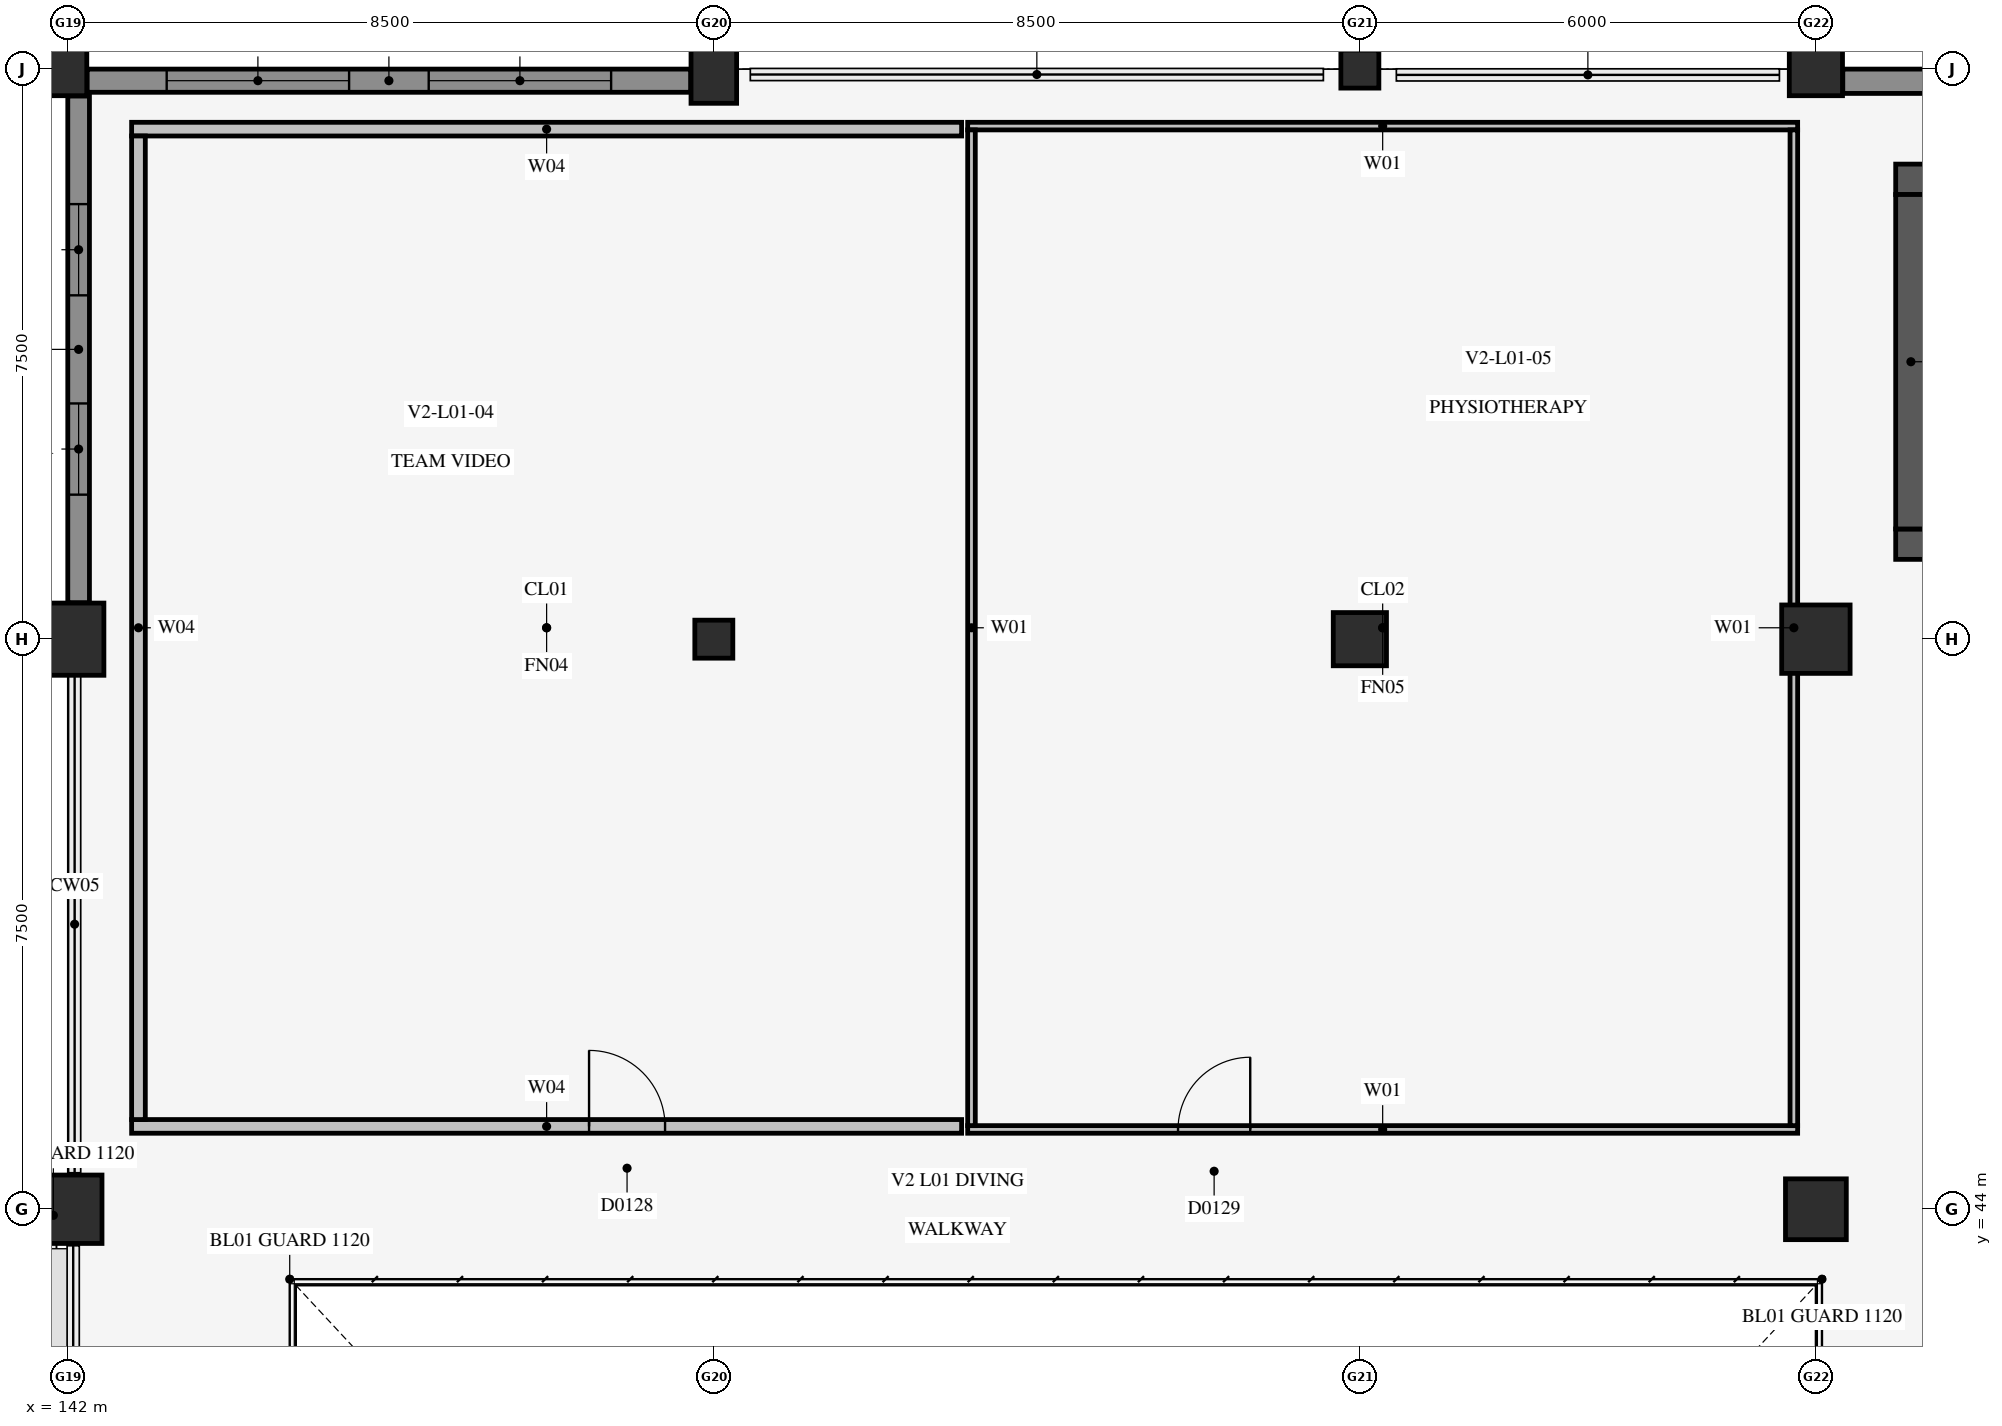
"""IFC4 building model, lengths in metres.
Left out: names, types, materials, properties, quantities, classifications, styles, units other than length and angle.
Written with IfcOpenShell. Run it as: python <this file> out.ifc"""

import sys

from ifc_helpers import new_model, si_unit, direction, frame, frame_2d, origin, origin_2d, place, context, subcontext, project, spatial, rectangle, circle, extrude, element, fill, save


model = new_model("IFC4")
c1 = context("Model", 3, precision=1e-05, world=origin(), true_north=direction((0.0, 1.0)))
c2 = subcontext(c1, "Body", "Model", "MODEL_VIEW")
j1 = project(units=[si_unit("LENGTHUNIT", "METRE"), si_unit("PLANEANGLEUNIT", "RADIAN")], contexts=[c1])
p1 = place(None, origin())
s1 = spatial("IfcSite", under=j1, at=p1, CompositionType="ELEMENT")
p2 = place(p1, origin())
s2 = spatial("IfcBuilding", under=s1, at=p2, CompositionType="ELEMENT")
p3 = place(p2, frame((0.0, 0.0, 5.4)))
s3 = spatial("IfcBuildingStorey", under=s2, at=p3, CompositionType="ELEMENT", Elevation=5.4)
p4 = place(p3, frame((166.05, 52.75, 0.0), z_axis=(0.0, 0.0, 1.0), x_axis=(1.0, 0.0, 0.0)))
e1 = element("IfcWall", 1, at=p4, inside=s3, PredefinedType="SHEAR", context=c2, shape_type="SweptSolid", body=[
    extrude(rectangle(XDim=9.5, YDim=0.4, at=frame_2d((4.75, 0.0))), origin(), (0.0, 0.0, 1.0), 4.56),
])
p5 = place(p4, frame((0.48, 0.0, 0.0)))
e2 = element("IfcOpeningElement", 2, at=p5, cuts=e1, PredefinedType="OPENING", context=c2, shape_type="SweptSolid", body=[
    extrude(rectangle(XDim=1.5, YDim=2.3, at=frame_2d((0.75, 1.15))), frame((0.0, 0.212, 0.0), z_axis=(0.0, -1.0, 0.0), x_axis=(1.0, 0.0, 0.0)), (0.0, 0.0, 1.0), 0.424),
])
p6 = place(p3, frame((166.05, 57.55, 0.0), z_axis=(0.0, 0.0, 1.0), x_axis=(1.0, 0.0, 0.0)))
e3 = element("IfcWall", 3, at=p6, inside=s3, PredefinedType="SHEAR", context=c2, shape_type="SweptSolid", body=[
    extrude(rectangle(XDim=9.5, YDim=0.4, at=frame_2d((4.75, 0.0))), origin(), (0.0, 0.0, 1.0), 4.56),
])
p7 = place(p3, frame((166.25, 52.95, 0.0), z_axis=(0.0, 0.0, 1.0), x_axis=(0.0, 1.0, 0.0)))
e4 = element("IfcWall", 4, at=p7, inside=s3, PredefinedType="SHEAR", context=c2, shape_type="SweptSolid", body=[
    extrude(rectangle(XDim=4.4, YDim=0.4, at=frame_2d((2.2, 0.0))), origin(), (0.0, 0.0, 1.0), 4.56),
])
p8 = place(p3, frame((142.0, 44.0, 0.0), z_axis=(0.0, 0.0, 1.0), x_axis=(1.0, 0.0, 0.0)))
e5 = element("IfcColumn", 5, at=p8, inside=s3, PredefinedType="COLUMN", context=c2, shape_type="SweptSolid", body=[
    extrude(rectangle(XDim=0.9, YDim=0.9, at=origin_2d()), origin(), (0.0, 0.0, 1.0), 4.8),
])
p9 = place(p3, frame((142.0, 51.5, 0.0), z_axis=(0.0, 0.0, 1.0), x_axis=(1.0, 0.0, 0.0)))
e6 = element("IfcColumn", 6, at=p9, inside=s3, PredefinedType="COLUMN", context=c2, shape_type="SweptSolid", body=[
    extrude(rectangle(XDim=0.95, YDim=0.95, at=origin_2d()), origin(), (0.0, 0.0, 1.0), 4.8),
])
p10 = place(p3, frame((142.0, 59.0, 0.0), z_axis=(0.0, 0.0, 1.0), x_axis=(1.0, 0.0, 0.0)))
e7 = element("IfcColumn", 7, at=p10, inside=s3, PredefinedType="COLUMN", context=c2, shape_type="SweptSolid", body=[
    extrude(rectangle(XDim=0.5, YDim=0.7, at=origin_2d()), origin(), (0.0, 0.0, 1.0), 4.8),
])
p11 = place(p3, frame((150.5, 51.5, 0.0), z_axis=(0.0, 0.0, 1.0), x_axis=(1.0, 0.0, 0.0)))
e8 = element("IfcColumn", 8, at=p11, inside=s3, PredefinedType="COLUMN", context=c2, shape_type="SweptSolid", body=[
    extrude(circle(Radius=0.25, at=origin_2d()), origin(), (0.0, 0.0, 1.0), 4.8),
])
p12 = place(p3, frame((150.5, 59.0, 0.0), z_axis=(0.0, 0.0, 1.0), x_axis=(1.0, 0.0, 0.0)))
e9 = element("IfcColumn", 9, at=p12, inside=s3, PredefinedType="COLUMN", context=c2, shape_type="SweptSolid", body=[
    extrude(rectangle(XDim=0.6, YDim=0.9, at=origin_2d()), origin(), (0.0, 0.0, 1.0), 4.8),
])
p13 = place(p3, frame((159.0, 51.5, 0.0), z_axis=(0.0, 0.0, 1.0), x_axis=(1.0, 0.0, 0.0)))
e10 = element("IfcColumn", 10, at=p13, inside=s3, PredefinedType="COLUMN", context=c2, shape_type="SweptSolid", body=[
    extrude(circle(Radius=0.35, at=origin_2d()), origin(), (0.0, 0.0, 1.0), 4.8),
])
p14 = place(p3, frame((159.0, 59.0, 0.0), z_axis=(0.0, 0.0, 1.0), x_axis=(1.0, 0.0, 0.0)))
e11 = element("IfcColumn", 11, at=p14, inside=s3, PredefinedType="COLUMN", context=c2, shape_type="SweptSolid", body=[
    extrude(circle(Radius=0.25, at=origin_2d()), origin(), (0.0, 0.0, 1.0), 4.8),
])
p15 = place(p3, frame((165.0, 44.0, 0.0), z_axis=(0.0, 0.0, 1.0), x_axis=(1.0, 0.0, 0.0)))
e12 = element("IfcColumn", 12, at=p15, inside=s3, PredefinedType="COLUMN", context=c2, shape_type="SweptSolid", body=[
    extrude(circle(Radius=0.4, at=origin_2d()), origin(), (0.0, 0.0, 1.0), 4.8),
])
p16 = place(p3, frame((165.0, 51.5, 0.0), z_axis=(0.0, 0.0, 1.0), x_axis=(1.0, 0.0, 0.0)))
e13 = element("IfcColumn", 13, at=p16, inside=s3, PredefinedType="COLUMN", context=c2, shape_type="SweptSolid", body=[
    extrude(circle(Radius=0.45, at=origin_2d()), origin(), (0.0, 0.0, 1.0), 4.8),
])
p17 = place(p3, frame((165.0, 59.0, 0.0), z_axis=(0.0, 0.0, 1.0), x_axis=(1.0, 0.0, 0.0)))
e14 = element("IfcColumn", 14, at=p17, inside=s3, PredefinedType="COLUMN", context=c2, shape_type="SweptSolid", body=[
    extrude(circle(Radius=0.35, at=origin_2d()), origin(), (0.0, 0.0, 1.0), 4.8),
])
p18 = place(p3, frame((142.84, 45.09, 0.0), z_axis=(0.0, 0.0, 1.0), x_axis=(1.0, 0.0, 0.0)))
e15 = element("IfcWall", 15, at=p18, inside=s3, PredefinedType="PARTITIONING", context=c2, shape_type="SweptSolid", body=[
    extrude(rectangle(XDim=10.92, YDim=0.18, at=frame_2d((5.46, 0.0))), origin(), (0.0, 0.0, 1.0), 4.545),
])
p19 = place(p18, frame((6.018, 0.0, 0.0)))
e16 = element("IfcOpeningElement", 16, at=p19, cuts=e15, PredefinedType="OPENING", context=c2, shape_type="SweptSolid", body=[
    extrude(rectangle(XDim=1.0, YDim=2.2, at=frame_2d((0.5, 1.1))), frame((0.0, 0.102, 0.0), z_axis=(0.0, -1.0, 0.0), x_axis=(1.0, 0.0, 0.0)), (0.0, 0.0, 1.0), 0.204),
])
p20 = place(p3, frame((142.84, 58.21, 0.0), z_axis=(0.0, 0.0, 1.0), x_axis=(1.0, 0.0, 0.0)))
e17 = element("IfcWall", 17, at=p20, inside=s3, PredefinedType="PARTITIONING", context=c2, shape_type="SweptSolid", body=[
    extrude(rectangle(XDim=10.92, YDim=0.18, at=frame_2d((5.46, 0.0))), origin(), (0.0, 0.0, 1.0), 4.545),
])
p21 = place(p3, frame((142.93, 45.18, 0.0), z_axis=(0.0, 0.0, 1.0), x_axis=(0.0, 1.0, 0.0)))
e18 = element("IfcWall", 18, at=p21, inside=s3, PredefinedType="PARTITIONING", context=c2, shape_type="SweptSolid", body=[
    extrude(rectangle(XDim=12.94, YDim=0.18, at=frame_2d((6.47, 0.0))), origin(), (0.0, 0.0, 1.0), 4.545),
])
p22 = place(p3, frame((153.84, 45.05, 0.0), z_axis=(0.0, 0.0, 1.0), x_axis=(1.0, 0.0, 0.0)))
e19 = element("IfcWall", 19, at=p22, inside=s3, PredefinedType="PARTITIONING", context=c2, shape_type="SweptSolid", body=[
    extrude(rectangle(XDim=10.92, YDim=0.1, at=frame_2d((5.46, 0.0))), origin(), (0.0, 0.0, 1.0), 4.545),
])
p23 = place(p22, frame((2.768, 0.0, 0.0)))
e20 = element("IfcOpeningElement", 20, at=p23, cuts=e19, PredefinedType="OPENING", context=c2, shape_type="SweptSolid", body=[
    extrude(rectangle(XDim=0.95, YDim=2.15, at=frame_2d((0.475, 1.075))), frame((0.0, 0.062, 0.0), z_axis=(0.0, -1.0, 0.0), x_axis=(1.0, 0.0, 0.0)), (0.0, 0.0, 1.0), 0.124),
])
p24 = place(p3, frame((153.84, 58.25, 0.0), z_axis=(0.0, 0.0, 1.0), x_axis=(1.0, 0.0, 0.0)))
e21 = element("IfcWall", 21, at=p24, inside=s3, PredefinedType="PARTITIONING", context=c2, shape_type="SweptSolid", body=[
    extrude(rectangle(XDim=10.92, YDim=0.1, at=frame_2d((5.46, 0.0))), origin(), (0.0, 0.0, 1.0), 4.545),
])
for number, where, z_axis, x_axis in (
    (22, (164.71, 45.1, 0.0), (0.0, 0.0, 1.0), (0.0, 1.0, 0.0)),
    (23, (153.89, 45.1, 0.0), (0.0, 0.0, 1.0), (0.0, 1.0, 0.0)),
):
    element("IfcWall", number, at=place(p3, frame(where, z_axis=z_axis, x_axis=x_axis)), inside=s3, PredefinedType="PARTITIONING", context=c2, shape_type="SweptSolid", body=[
        extrude(rectangle(XDim=13.1, YDim=0.1, at=frame_2d((6.55, 0.0))), origin(), (0.0, 0.0, 1.0), 4.545),
    ])
p25 = place(p3, frame((142.254, 58.847, 0.0), z_axis=(0.0, 0.0, 1.0), x_axis=(1.0, 0.0, 0.0)))
e24 = element("IfcWall", 24, at=p25, inside=s3, PredefinedType="SOLIDWALL", context=c2, shape_type="SweptSolid", body=[
    extrude(rectangle(XDim=7.942, YDim=0.305, at=frame_2d((3.971, 0.0))), origin(), (0.0, 0.0, 1.0), 4.117),
])
p26 = place(p25, frame((1.047, 0.0, 0.95)))
e25 = element("IfcOpeningElement", 25, at=p26, cuts=e24, PredefinedType="OPENING", context=c2, shape_type="SweptSolid", body=[
    extrude(rectangle(XDim=2.4, YDim=1.2, at=frame_2d((1.2, 0.6))), frame((0.0, 0.165, 0.0), z_axis=(0.0, -1.0, 0.0), x_axis=(1.0, 0.0, 0.0)), (0.0, 0.0, 1.0), 0.329),
])
p27 = place(p25, frame((4.495, 0.0, 0.95)))
e26 = element("IfcOpeningElement", 26, at=p27, cuts=e24, PredefinedType="OPENING", context=c2, shape_type="SweptSolid", body=[
    extrude(rectangle(XDim=2.4, YDim=1.2, at=frame_2d((1.2, 0.6))), frame((0.0, 0.165, 0.0), z_axis=(0.0, -1.0, 0.0), x_axis=(1.0, 0.0, 0.0)), (0.0, 0.0, 1.0), 0.329),
])
p28 = place(p3, frame((165.354, 58.84, 0.0), z_axis=(0.0, 0.0, 1.0), x_axis=(1.0, 0.0, 0.0)))
e27 = element("IfcWall", 27, at=p28, inside=s3, PredefinedType="SOLIDWALL", context=c2, shape_type="SweptSolid", body=[
    extrude(rectangle(XDim=10.192, YDim=0.32, at=frame_2d((5.096, 0.0))), origin(), (0.0, 0.0, 1.0), 3.918),
])
p29 = place(p28, frame((1.997, 0.0, 0.95)))
e28 = element("IfcOpeningElement", 28, at=p29, cuts=e27, PredefinedType="OPENING", context=c2, shape_type="SweptSolid", body=[
    extrude(rectangle(XDim=2.1, YDim=1.5, at=frame_2d((1.05, 0.75))), frame((0.0, 0.172, 0.0), z_axis=(0.0, -1.0, 0.0), x_axis=(1.0, 0.0, 0.0)), (0.0, 0.0, 1.0), 0.344),
])
p30 = place(p28, frame((6.095, 0.0, 0.95)))
e29 = element("IfcOpeningElement", 29, at=p30, cuts=e27, PredefinedType="OPENING", context=c2, shape_type="SweptSolid", body=[
    extrude(rectangle(XDim=2.1, YDim=1.5, at=frame_2d((1.05, 0.75))), frame((0.0, 0.172, 0.0), z_axis=(0.0, -1.0, 0.0), x_axis=(1.0, 0.0, 0.0)), (0.0, 0.0, 1.0), 0.344),
])
p31 = place(p3, frame((142.143, 51.979, 0.0), z_axis=(0.0, 0.0, 1.0), x_axis=(0.0, 1.0, 0.0)))
e30 = element("IfcWall", 30, at=p31, inside=s3, PredefinedType="SOLIDWALL", context=c2, shape_type="SweptSolid", body=[
    extrude(rectangle(XDim=6.667, YDim=0.285, at=frame_2d((3.333, 0.0))), origin(), (0.0, 0.0, 1.0), 4.117),
])
p32 = place(p31, frame((1.422, 0.0, 0.95)))
e31 = element("IfcOpeningElement", 31, at=p32, cuts=e30, PredefinedType="OPENING", context=c2, shape_type="SweptSolid", body=[
    extrude(rectangle(XDim=1.2, YDim=1.2, at=frame_2d((0.6, 0.6))), frame((0.0, 0.154, 0.0), z_axis=(0.0, -1.0, 0.0), x_axis=(1.0, 0.0, 0.0)), (0.0, 0.0, 1.0), 0.309),
])
p33 = place(p31, frame((4.045, 0.0, 0.95)))
e32 = element("IfcOpeningElement", 32, at=p33, cuts=e30, PredefinedType="OPENING", context=c2, shape_type="SweptSolid", body=[
    extrude(rectangle(XDim=1.2, YDim=1.2, at=frame_2d((0.6, 0.6))), frame((0.0, 0.154, 0.0), z_axis=(0.0, -1.0, 0.0), x_axis=(1.0, 0.0, 0.0)), (0.0, 0.0, 1.0), 0.309),
])
p34 = place(p19, origin())
e33 = element("IfcDoor", 33, at=p34, inside=s3, OperationType="SINGLE_SWING_LEFT", PredefinedType="DOOR", context=c2, shape_type="SweptSolid", body=[
    extrude(rectangle(XDim=1.0, YDim=2.2, at=frame_2d((0.5, 1.1))), frame((0.0, 0.025, 0.0), z_axis=(0.0, -1.0, 0.0), x_axis=(1.0, 0.0, 0.0)), (0.0, 0.0, 1.0), 0.05),
])
fill(e16, e33)
p35 = place(p23, origin())
e34 = element("IfcDoor", 34, at=p35, inside=s3, OperationType="SINGLE_SWING_RIGHT", PredefinedType="DOOR", context=c2, shape_type="SweptSolid", body=[
    extrude(rectangle(XDim=0.95, YDim=2.15, at=frame_2d((0.475, 1.075))), frame((0.0, 0.025, 0.0), z_axis=(0.0, -1.0, 0.0), x_axis=(1.0, 0.0, 0.0)), (0.0, 0.0, 1.0), 0.05),
])
fill(e20, e34)
p36 = place(p26, origin())
e35 = element("IfcWindow", 35, at=p36, inside=s3, PartitioningType="SINGLE_PANEL", PredefinedType="WINDOW", context=c2, shape_type="SweptSolid", body=[
    extrude(rectangle(XDim=2.4, YDim=1.2, at=frame_2d((1.2, 0.6))), frame((0.0, 0.03, 0.0), z_axis=(0.0, -1.0, 0.0), x_axis=(1.0, 0.0, 0.0)), (0.0, 0.0, 1.0), 0.06),
])
fill(e25, e35)
p37 = place(p27, origin())
e36 = element("IfcWindow", 36, at=p37, inside=s3, PartitioningType="SINGLE_PANEL", PredefinedType="WINDOW", context=c2, shape_type="SweptSolid", body=[
    extrude(rectangle(XDim=2.4, YDim=1.2, at=frame_2d((1.2, 0.6))), frame((0.0, 0.03, 0.0), z_axis=(0.0, -1.0, 0.0), x_axis=(1.0, 0.0, 0.0)), (0.0, 0.0, 1.0), 0.06),
])
fill(e26, e36)
p38 = place(p32, origin())
e37 = element("IfcWindow", 37, at=p38, inside=s3, PartitioningType="SINGLE_PANEL", PredefinedType="WINDOW", context=c2, shape_type="SweptSolid", body=[
    extrude(rectangle(XDim=1.2, YDim=1.2, at=frame_2d((0.6, 0.6))), frame((0.0, 0.03, 0.0), z_axis=(0.0, -1.0, 0.0), x_axis=(1.0, 0.0, 0.0)), (0.0, 0.0, 1.0), 0.06),
])
fill(e31, e37)
p39 = place(p33, origin())
e38 = element("IfcWindow", 38, at=p39, inside=s3, PartitioningType="SINGLE_PANEL", PredefinedType="WINDOW", context=c2, shape_type="SweptSolid", body=[
    extrude(rectangle(XDim=1.2, YDim=1.2, at=frame_2d((0.6, 0.6))), frame((0.0, 0.03, 0.0), z_axis=(0.0, -1.0, 0.0), x_axis=(1.0, 0.0, 0.0)), (0.0, 0.0, 1.0), 0.06),
])
fill(e32, e38)
save(model, sys.argv[1])
